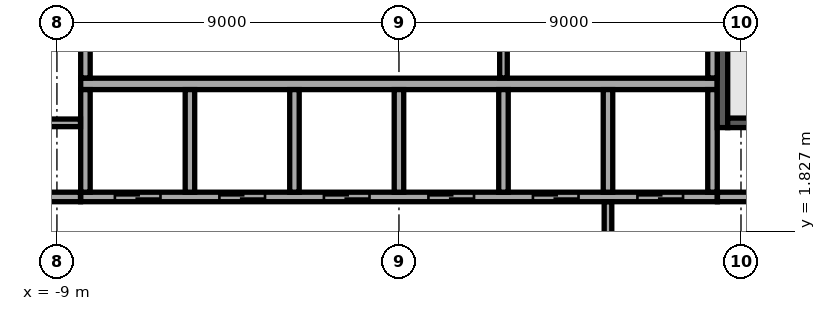
"""IFC4 building model, lengths in metres.
Left out: names, types, materials, properties, quantities, classifications, styles, units other than length and angle.
Written with IfcOpenShell. Run it as: python <this file> out.ifc"""

import sys

from ifc_helpers import new_model, si_unit, direction, frame, frame_2d, origin, place, context, subcontext, project, spatial, rectangle, extrude, element, fill, save


model = new_model("IFC4")
c1 = context("Model", 3, precision=1e-05, world=origin(), true_north=direction((0.0, 1.0)))
c2 = subcontext(c1, "Body", "Model", "MODEL_VIEW")
j1 = project(units=[si_unit("LENGTHUNIT", "METRE"), si_unit("PLANEANGLEUNIT", "RADIAN")], contexts=[c1])
p1 = place(None, origin())
s1 = spatial("IfcSite", under=j1, at=p1, CompositionType="ELEMENT")
p2 = place(p1, origin())
s2 = spatial("IfcBuilding", under=s1, at=p2, CompositionType="ELEMENT")
p3 = place(p2, frame((0.0, 0.0, 163.7)))
s3 = spatial("IfcBuildingStorey", under=s2, at=p3, CompositionType="ELEMENT", Elevation=163.7)
p4 = place(p3, frame((-8.375, 5.7, 0.0), z_axis=(0.0, 0.0, 1.0), x_axis=(1.0, 0.0, 0.0)))
e1 = element("IfcWall", 1, at=p4, inside=s3, PredefinedType="SOLIDWALL", context=c2, shape_type="SweptSolid", body=[
    extrude(rectangle(XDim=16.75, YDim=0.3, at=frame_2d((8.375, 0.0))), origin(), (0.0, 0.0, 1.0), 3.6),
])
p5 = place(p3, frame((-8.375, 2.725, 0.0), z_axis=(0.0, 0.0, 1.0), x_axis=(1.0, 0.0, 0.0)))
e2 = element("IfcWall", 2, at=p5, inside=s3, PredefinedType="SOLIDWALL", context=c2, shape_type="SweptSolid", body=[
    extrude(rectangle(XDim=16.75, YDim=0.25, at=frame_2d((8.375, 0.0))), origin(), (0.0, 0.0, 1.0), 3.6),
])
p6 = place(p5, frame((0.9, 0.0, 0.0)))
e3 = element("IfcOpeningElement", 3, at=p6, cuts=e2, PredefinedType="OPENING", context=c2, shape_type="SweptSolid", body=[
    extrude(rectangle(XDim=1.2, YDim=2.1, at=frame_2d((0.6, 1.05))), frame((0.0, 0.135, 0.0), z_axis=(0.0, -1.0, 0.0), x_axis=(1.0, 0.0, 0.0)), (0.0, 0.0, 1.0), 0.27),
])
p7 = place(p5, frame((3.65, 0.0, 0.0)))
e4 = element("IfcOpeningElement", 4, at=p7, cuts=e2, PredefinedType="OPENING", context=c2, shape_type="SweptSolid", body=[
    extrude(rectangle(XDim=1.2, YDim=2.1, at=frame_2d((0.6, 1.05))), frame((0.0, 0.135, 0.0), z_axis=(0.0, -1.0, 0.0), x_axis=(1.0, 0.0, 0.0)), (0.0, 0.0, 1.0), 0.27),
])
p8 = place(p5, frame((6.4, 0.0, 0.0)))
e5 = element("IfcOpeningElement", 5, at=p8, cuts=e2, PredefinedType="OPENING", context=c2, shape_type="SweptSolid", body=[
    extrude(rectangle(XDim=1.2, YDim=2.1, at=frame_2d((0.6, 1.05))), frame((0.0, 0.135, 0.0), z_axis=(0.0, -1.0, 0.0), x_axis=(1.0, 0.0, 0.0)), (0.0, 0.0, 1.0), 0.27),
])
p9 = place(p5, frame((9.15, 0.0, 0.0)))
e6 = element("IfcOpeningElement", 6, at=p9, cuts=e2, PredefinedType="OPENING", context=c2, shape_type="SweptSolid", body=[
    extrude(rectangle(XDim=1.2, YDim=2.1, at=frame_2d((0.6, 1.05))), frame((0.0, 0.135, 0.0), z_axis=(0.0, -1.0, 0.0), x_axis=(1.0, 0.0, 0.0)), (0.0, 0.0, 1.0), 0.27),
])
p10 = place(p5, frame((11.9, 0.0, 0.0)))
e7 = element("IfcOpeningElement", 7, at=p10, cuts=e2, PredefinedType="OPENING", context=c2, shape_type="SweptSolid", body=[
    extrude(rectangle(XDim=1.2, YDim=2.1, at=frame_2d((0.6, 1.05))), frame((0.0, 0.135, 0.0), z_axis=(0.0, -1.0, 0.0), x_axis=(1.0, 0.0, 0.0)), (0.0, 0.0, 1.0), 0.27),
])
p11 = place(p5, frame((14.65, 0.0, 0.0)))
e8 = element("IfcOpeningElement", 8, at=p11, cuts=e2, PredefinedType="OPENING", context=c2, shape_type="SweptSolid", body=[
    extrude(rectangle(XDim=1.2, YDim=2.1, at=frame_2d((0.6, 1.05))), frame((0.0, 0.135, 0.0), z_axis=(0.0, -1.0, 0.0), x_axis=(1.0, 0.0, 0.0)), (0.0, 0.0, 1.0), 0.27),
])
for number, where, z_axis, x_axis in (
    (9, (-8.25, 2.85, 0.0), (0.0, 0.0, 1.0), (0.0, 1.0, 0.0)),
    (10, (-5.5, 2.85, 0.0), (0.0, 0.0, 1.0), (0.0, 1.0, 0.0)),
    (11, (-2.75, 2.85, 0.0), (0.0, 0.0, 1.0), (0.0, 1.0, 0.0)),
    (12, (0.0, 2.85, 0.0), (0.0, 0.0, 1.0), (0.0, 1.0, 0.0)),
    (13, (2.75, 2.85, 0.0), (0.0, 0.0, 1.0), (0.0, 1.0, 0.0)),
    (14, (5.5, 2.85, 0.0), (0.0, 0.0, 1.0), (0.0, 1.0, 0.0)),
    (15, (8.25, 2.85, 0.0), (0.0, 0.0, 1.0), (0.0, 1.0, 0.0)),
):
    element("IfcWall", number, at=place(p3, frame(where, z_axis=z_axis, x_axis=x_axis)), inside=s3, PredefinedType="SOLIDWALL", context=c2, shape_type="SweptSolid", body=[
        extrude(rectangle(XDim=2.7, YDim=0.25, at=frame_2d((1.35, 0.0))), origin(), (0.0, 0.0, 1.0), 3.6),
    ])
p12 = place(p3, frame((8.512, 4.55, 0.0), z_axis=(0.0, 0.0, 1.0), x_axis=(0.0, 1.0, 0.0)))
e16 = element("IfcWall", 16, at=p12, inside=s3, PredefinedType="SOLIDWALL", context=c2, shape_type="SweptSolid", body=[
    extrude(rectangle(XDim=7.25, YDim=0.275, at=frame_2d((3.625, 0.0))), origin(), (0.0, 0.0, 1.0), 3.6),
])
p13 = place(p12, frame((6.0, 0.0, 0.0)))
e17 = element("IfcOpeningElement", 17, at=p13, cuts=e16, PredefinedType="OPENING", context=c2, shape_type="SweptSolid", body=[
    extrude(rectangle(XDim=1.0, YDim=2.1, at=frame_2d((0.5, 1.05))), frame((0.0, 0.147, 0.0), z_axis=(0.0, -1.0, 0.0), x_axis=(1.0, 0.0, 0.0)), (0.0, 0.0, 1.0), 0.295),
])
p14 = place(p3, frame((8.65, 4.675, 0.0), z_axis=(0.0, 0.0, 1.0), x_axis=(1.0, 0.0, 0.0)))
e18 = element("IfcWall", 18, at=p14, inside=s3, PredefinedType="SOLIDWALL", context=c2, shape_type="SweptSolid", body=[
    extrude(rectangle(XDim=3.15, YDim=0.25, at=frame_2d((1.575, 0.0))), origin(), (0.0, 0.0, 1.0), 3.6),
])
p15 = place(p3, frame((5.5, -2.595, 0.0), z_axis=(0.0, 0.0, 1.0), x_axis=(0.0, 1.0, 0.0)))
e19 = element("IfcWall", 19, at=p15, inside=s3, PredefinedType="PARTITIONING", context=c2, shape_type="SweptSolid", body=[
    extrude(rectangle(XDim=5.19, YDim=0.2, at=frame_2d((2.595, 0.0))), origin(), (0.0, 0.0, 1.0), 3.6),
])
p16 = place(p15, frame((1.395, 0.0, 0.0)))
e20 = element("IfcOpeningElement", 20, at=p16, cuts=e19, PredefinedType="OPENING", context=c2, shape_type="SweptSolid", body=[
    extrude(rectangle(XDim=2.4, YDim=2.4, at=frame_2d((1.2, 1.2))), frame((0.0, 0.11, 0.0), z_axis=(0.0, -1.0, 0.0), x_axis=(1.0, 0.0, 0.0)), (0.0, 0.0, 1.0), 0.22),
])
p17 = place(p3, frame((-11.795, 2.725, 0.0), z_axis=(0.0, 0.0, 1.0), x_axis=(1.0, 0.0, 0.0)))
e21 = element("IfcWall", 21, at=p17, inside=s3, PredefinedType="PARTITIONING", context=c2, shape_type="SweptSolid", body=[
    extrude(rectangle(XDim=3.415, YDim=0.25, at=frame_2d((1.708, 0.0))), origin(), (0.0, 0.0, 1.0), 3.6),
])
p18 = place(p17, frame((1.345, 0.0, 0.0)))
e22 = element("IfcOpeningElement", 22, at=p18, cuts=e21, PredefinedType="OPENING", context=c2, shape_type="SweptSolid", body=[
    extrude(rectangle(XDim=0.9, YDim=2.1, at=frame_2d((0.45, 1.05))), frame((0.0, 0.135, 0.0), z_axis=(0.0, -1.0, 0.0), x_axis=(1.0, 0.0, 0.0)), (0.0, 0.0, 1.0), 0.27),
])
p19 = place(p3, frame((8.38, 2.725, 0.0), z_axis=(0.0, 0.0, 1.0), x_axis=(1.0, 0.0, 0.0)))
e23 = element("IfcWall", 23, at=p19, inside=s3, PredefinedType="PARTITIONING", context=c2, shape_type="SweptSolid", body=[
    extrude(rectangle(XDim=3.415, YDim=0.25, at=frame_2d((1.708, 0.0))), origin(), (0.0, 0.0, 1.0), 3.6),
])
p20 = place(p19, frame((1.17, 0.0, 0.0)))
e24 = element("IfcOpeningElement", 24, at=p20, cuts=e23, PredefinedType="OPENING", context=c2, shape_type="SweptSolid", body=[
    extrude(rectangle(XDim=0.9, YDim=2.1, at=frame_2d((0.45, 1.05))), frame((0.0, 0.135, 0.0), z_axis=(0.0, -1.0, 0.0), x_axis=(1.0, 0.0, 0.0)), (0.0, 0.0, 1.0), 0.27),
])
p21 = place(p3, frame((-11.795, 4.675, 0.0), z_axis=(0.0, 0.0, 1.0), x_axis=(1.0, 0.0, 0.0)))
e25 = element("IfcWall", 25, at=p21, inside=s3, PredefinedType="PARTITIONING", context=c2, shape_type="SweptSolid", body=[
    extrude(rectangle(XDim=3.415, YDim=0.2, at=frame_2d((1.708, 0.0))), origin(), (0.0, 0.0, 1.0), 3.6),
])
p22 = place(p3, frame((-8.25, 5.855, 0.0), z_axis=(0.0, 0.0, 1.0), x_axis=(0.0, 1.0, 0.0)))
e26 = element("IfcWall", 26, at=p22, inside=s3, PredefinedType="PARTITIONING", context=c2, shape_type="SweptSolid", body=[
    extrude(rectangle(XDim=2.69, YDim=0.25, at=frame_2d((1.345, 0.0))), origin(), (0.0, 0.0, 1.0), 3.6),
])
p23 = place(p3, frame((2.75, 5.855, 0.0), z_axis=(0.0, 0.0, 1.0), x_axis=(0.0, 1.0, 0.0)))
e27 = element("IfcWall", 27, at=p23, inside=s3, PredefinedType="PARTITIONING", context=c2, shape_type="SweptSolid", body=[
    extrude(rectangle(XDim=2.69, YDim=0.2, at=frame_2d((1.345, 0.0))), origin(), (0.0, 0.0, 1.0), 3.6),
])
p24 = place(p3, frame((8.25, 5.855, 0.0), z_axis=(0.0, 0.0, 1.0), x_axis=(0.0, 1.0, 0.0)))
e28 = element("IfcWall", 28, at=p24, inside=s3, PredefinedType="PARTITIONING", context=c2, shape_type="SweptSolid", body=[
    extrude(rectangle(XDim=2.69, YDim=0.25, at=frame_2d((1.345, 0.0))), origin(), (0.0, 0.0, 1.0), 3.6),
])
p25 = place(p3, frame((4.48, 35.516, 0.0), z_axis=(0.0, 0.0, 1.0), x_axis=(-0.809018017995, -0.587783843398, 0.0)))
e29 = element("IfcWall", 29, at=p25, inside=s3, PredefinedType="STANDARD", context=c2, shape_type="SweptSolid", body=[
    extrude(rectangle(XDim=49.376, YDim=0.6, at=frame_2d((24.688, 0.0))), origin(), (0.0, 0.0, 1.0), 3.6),
])
p26 = place(p25, frame((1.2, 0.0, 0.9)))
e30 = element("IfcOpeningElement", 30, at=p26, cuts=e29, PredefinedType="OPENING", context=c2, shape_type="SweptSolid", body=[
    extrude(rectangle(XDim=2.1, YDim=2.1, at=frame_2d((1.05, 1.05))), frame((0.0, 0.31, 0.0), z_axis=(0.0, -1.0, 0.0), x_axis=(1.0, 0.0, 0.0)), (0.0, 0.0, 1.0), 0.62),
])
p27 = place(p25, frame((5.7, 0.0, 0.9)))
e31 = element("IfcOpeningElement", 31, at=p27, cuts=e29, PredefinedType="OPENING", context=c2, shape_type="SweptSolid", body=[
    extrude(rectangle(XDim=2.1, YDim=2.1, at=frame_2d((1.05, 1.05))), frame((0.0, 0.31, 0.0), z_axis=(0.0, -1.0, 0.0), x_axis=(1.0, 0.0, 0.0)), (0.0, 0.0, 1.0), 0.62),
])
p28 = place(p25, frame((10.2, 0.0, 0.9)))
e32 = element("IfcOpeningElement", 32, at=p28, cuts=e29, PredefinedType="OPENING", context=c2, shape_type="SweptSolid", body=[
    extrude(rectangle(XDim=2.1, YDim=2.1, at=frame_2d((1.05, 1.05))), frame((0.0, 0.31, 0.0), z_axis=(0.0, -1.0, 0.0), x_axis=(1.0, 0.0, 0.0)), (0.0, 0.0, 1.0), 0.62),
])
p29 = place(p25, frame((14.7, 0.0, 0.9)))
e33 = element("IfcOpeningElement", 33, at=p29, cuts=e29, PredefinedType="OPENING", context=c2, shape_type="SweptSolid", body=[
    extrude(rectangle(XDim=2.1, YDim=2.1, at=frame_2d((1.05, 1.05))), frame((0.0, 0.31, 0.0), z_axis=(0.0, -1.0, 0.0), x_axis=(1.0, 0.0, 0.0)), (0.0, 0.0, 1.0), 0.62),
])
p30 = place(p25, frame((19.2, 0.0, 0.9)))
e34 = element("IfcOpeningElement", 34, at=p30, cuts=e29, PredefinedType="OPENING", context=c2, shape_type="SweptSolid", body=[
    extrude(rectangle(XDim=2.1, YDim=2.1, at=frame_2d((1.05, 1.05))), frame((0.0, 0.31, 0.0), z_axis=(0.0, -1.0, 0.0), x_axis=(1.0, 0.0, 0.0)), (0.0, 0.0, 1.0), 0.62),
])
p31 = place(p25, frame((23.7, 0.0, 0.9)))
e35 = element("IfcOpeningElement", 35, at=p31, cuts=e29, PredefinedType="OPENING", context=c2, shape_type="SweptSolid", body=[
    extrude(rectangle(XDim=2.1, YDim=2.1, at=frame_2d((1.05, 1.05))), frame((0.0, 0.31, 0.0), z_axis=(0.0, -1.0, 0.0), x_axis=(1.0, 0.0, 0.0)), (0.0, 0.0, 1.0), 0.62),
])
p32 = place(p25, frame((28.2, 0.0, 0.9)))
e36 = element("IfcOpeningElement", 36, at=p32, cuts=e29, PredefinedType="OPENING", context=c2, shape_type="SweptSolid", body=[
    extrude(rectangle(XDim=2.1, YDim=2.1, at=frame_2d((1.05, 1.05))), frame((0.0, 0.31, 0.0), z_axis=(0.0, -1.0, 0.0), x_axis=(1.0, 0.0, 0.0)), (0.0, 0.0, 1.0), 0.62),
])
p33 = place(p25, frame((32.7, 0.0, 0.9)))
e37 = element("IfcOpeningElement", 37, at=p33, cuts=e29, PredefinedType="OPENING", context=c2, shape_type="SweptSolid", body=[
    extrude(rectangle(XDim=2.1, YDim=2.1, at=frame_2d((1.05, 1.05))), frame((0.0, 0.31, 0.0), z_axis=(0.0, -1.0, 0.0), x_axis=(1.0, 0.0, 0.0)), (0.0, 0.0, 1.0), 0.62),
])
p34 = place(p25, frame((37.2, 0.0, 0.9)))
e38 = element("IfcOpeningElement", 38, at=p34, cuts=e29, PredefinedType="OPENING", context=c2, shape_type="SweptSolid", body=[
    extrude(rectangle(XDim=2.1, YDim=2.1, at=frame_2d((1.05, 1.05))), frame((0.0, 0.31, 0.0), z_axis=(0.0, -1.0, 0.0), x_axis=(1.0, 0.0, 0.0)), (0.0, 0.0, 1.0), 0.62),
])
p35 = place(p25, frame((41.7, 0.0, 0.9)))
e39 = element("IfcOpeningElement", 39, at=p35, cuts=e29, PredefinedType="OPENING", context=c2, shape_type="SweptSolid", body=[
    extrude(rectangle(XDim=2.1, YDim=2.1, at=frame_2d((1.05, 1.05))), frame((0.0, 0.31, 0.0), z_axis=(0.0, -1.0, 0.0), x_axis=(1.0, 0.0, 0.0)), (0.0, 0.0, 1.0), 0.62),
])
p36 = place(p25, frame((46.138, 0.0, 0.9)))
e40 = element("IfcOpeningElement", 40, at=p36, cuts=e29, PredefinedType="OPENING", context=c2, shape_type="SweptSolid", body=[
    extrude(rectangle(XDim=2.1, YDim=2.1, at=frame_2d((1.05, 1.05))), frame((0.0, 0.31, 0.0), z_axis=(0.0, -1.0, 0.0), x_axis=(1.0, 0.0, 0.0)), (0.0, 0.0, 1.0), 0.62),
])
p37 = place(p3, frame((-26.166, 4.749, 0.0), z_axis=(0.0, 0.0, 1.0), x_axis=(0.809023795939, 0.587775890628, 0.0)))
e41 = element("IfcWall", 41, at=p37, inside=s3, PredefinedType="PARTITIONING", context=c2, shape_type="SweptSolid", body=[
    extrude(rectangle(XDim=36.756, YDim=0.15, at=frame_2d((18.378, 0.0))), origin(), (0.0, 0.0, 1.0), 3.15),
])
p38 = place(p37, frame((1.8, 0.0, 0.0)))
e42 = element("IfcOpeningElement", 42, at=p38, cuts=e41, PredefinedType="OPENING", context=c2, shape_type="SweptSolid", body=[
    extrude(rectangle(XDim=1.0, YDim=2.1, at=frame_2d((0.5, 1.05))), frame((0.0, 0.085, 0.0), z_axis=(0.0, -1.0, 0.0), x_axis=(1.0, 0.0, 0.0)), (0.0, 0.0, 1.0), 0.17),
])
p39 = place(p37, frame((7.453, 0.0, 0.0)))
e43 = element("IfcOpeningElement", 43, at=p39, cuts=e41, PredefinedType="OPENING", context=c2, shape_type="SweptSolid", body=[
    extrude(rectangle(XDim=1.0, YDim=2.1, at=frame_2d((0.5, 1.05))), frame((0.0, 0.085, 0.0), z_axis=(0.0, -1.0, 0.0), x_axis=(1.0, 0.0, 0.0)), (0.0, 0.0, 1.0), 0.17),
])
p40 = place(p37, frame((20.671, 0.0, 0.0)))
e44 = element("IfcOpeningElement", 44, at=p40, cuts=e41, PredefinedType="OPENING", context=c2, shape_type="SweptSolid", body=[
    extrude(rectangle(XDim=1.0, YDim=2.1, at=frame_2d((0.5, 1.05))), frame((0.0, 0.085, 0.0), z_axis=(0.0, -1.0, 0.0), x_axis=(1.0, 0.0, 0.0)), (0.0, 0.0, 1.0), 0.17),
])
p41 = place(p37, frame((27.382, 0.0, 0.0)))
e45 = element("IfcOpeningElement", 45, at=p41, cuts=e41, PredefinedType="OPENING", context=c2, shape_type="SweptSolid", body=[
    extrude(rectangle(XDim=1.8, YDim=2.1, at=frame_2d((0.9, 1.05))), frame((0.0, 0.085, 0.0), z_axis=(0.0, -1.0, 0.0), x_axis=(1.0, 0.0, 0.0)), (0.0, 0.0, 1.0), 0.17),
])
p42 = place(p6, origin())
e46 = element("IfcDoor", 46, at=p42, inside=s3, OperationType="DOUBLE_DOOR_SLIDING", PredefinedType="DOOR", context=c2, shape_type="SweptSolid", body=[
    extrude(rectangle(XDim=1.2, YDim=2.1, at=frame_2d((0.6, 1.05))), frame((0.0, 0.025, 0.0), z_axis=(0.0, -1.0, 0.0), x_axis=(1.0, 0.0, 0.0)), (0.0, 0.0, 1.0), 0.05),
])
fill(e3, e46)
p43 = place(p7, origin())
e47 = element("IfcDoor", 47, at=p43, inside=s3, OperationType="DOUBLE_DOOR_SLIDING", PredefinedType="DOOR", context=c2, shape_type="SweptSolid", body=[
    extrude(rectangle(XDim=1.2, YDim=2.1, at=frame_2d((0.6, 1.05))), frame((0.0, 0.025, 0.0), z_axis=(0.0, -1.0, 0.0), x_axis=(1.0, 0.0, 0.0)), (0.0, 0.0, 1.0), 0.05),
])
fill(e4, e47)
p44 = place(p8, origin())
e48 = element("IfcDoor", 48, at=p44, inside=s3, OperationType="DOUBLE_DOOR_SLIDING", PredefinedType="DOOR", context=c2, shape_type="SweptSolid", body=[
    extrude(rectangle(XDim=1.2, YDim=2.1, at=frame_2d((0.6, 1.05))), frame((0.0, 0.025, 0.0), z_axis=(0.0, -1.0, 0.0), x_axis=(1.0, 0.0, 0.0)), (0.0, 0.0, 1.0), 0.05),
])
fill(e5, e48)
p45 = place(p9, origin())
e49 = element("IfcDoor", 49, at=p45, inside=s3, OperationType="DOUBLE_DOOR_SLIDING", PredefinedType="DOOR", context=c2, shape_type="SweptSolid", body=[
    extrude(rectangle(XDim=1.2, YDim=2.1, at=frame_2d((0.6, 1.05))), frame((0.0, 0.025, 0.0), z_axis=(0.0, -1.0, 0.0), x_axis=(1.0, 0.0, 0.0)), (0.0, 0.0, 1.0), 0.05),
])
fill(e6, e49)
p46 = place(p10, origin())
e50 = element("IfcDoor", 50, at=p46, inside=s3, OperationType="DOUBLE_DOOR_SLIDING", PredefinedType="DOOR", context=c2, shape_type="SweptSolid", body=[
    extrude(rectangle(XDim=1.2, YDim=2.1, at=frame_2d((0.6, 1.05))), frame((0.0, 0.025, 0.0), z_axis=(0.0, -1.0, 0.0), x_axis=(1.0, 0.0, 0.0)), (0.0, 0.0, 1.0), 0.05),
])
fill(e7, e50)
p47 = place(p11, origin())
e51 = element("IfcDoor", 51, at=p47, inside=s3, OperationType="DOUBLE_DOOR_SLIDING", PredefinedType="DOOR", context=c2, shape_type="SweptSolid", body=[
    extrude(rectangle(XDim=1.2, YDim=2.1, at=frame_2d((0.6, 1.05))), frame((0.0, 0.025, 0.0), z_axis=(0.0, -1.0, 0.0), x_axis=(1.0, 0.0, 0.0)), (0.0, 0.0, 1.0), 0.05),
])
fill(e8, e51)
save(model, sys.argv[1])
